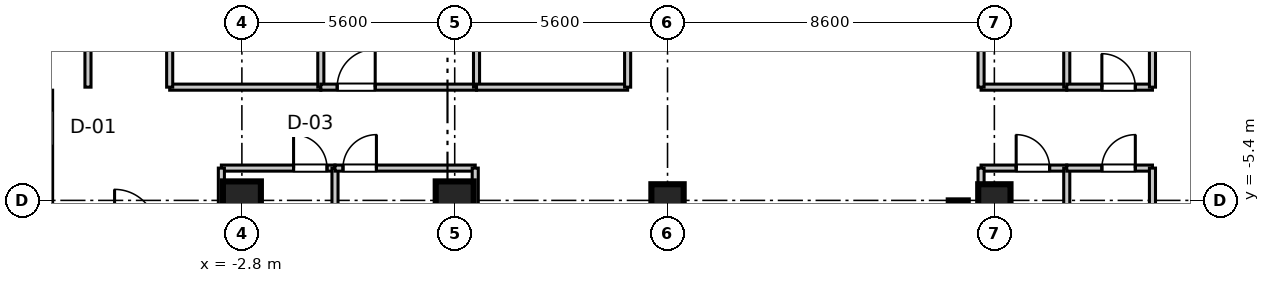
"""IFC4 building model, lengths in metres.
Left out: names, types, materials, properties, quantities, classifications, styles, units other than length and angle.
Written with IfcOpenShell. Run it as: python <this file> out.ifc"""

import sys

from ifc_helpers import new_model, si_unit, direction, frame, frame_2d, origin, origin_2d, place, context, subcontext, project, spatial, rectangle, extrude, source, transform, mapped, element, fill, save


model = new_model("IFC4")
c1 = context("Model", 3, precision=1e-05, world=origin(), true_north=direction((0.0, 1.0)))
c2 = subcontext(c1, "Body", "Model", "MODEL_VIEW")
j1 = project(units=[si_unit("LENGTHUNIT", "METRE"), si_unit("PLANEANGLEUNIT", "RADIAN")], contexts=[c1])
p1 = place(None, origin())
s1 = spatial("IfcSite", under=j1, at=p1, CompositionType="ELEMENT")
p2 = place(p1, origin())
s2 = spatial("IfcBuilding", under=s1, at=p2, CompositionType="ELEMENT")
p3 = place(p2, frame((0.0, 0.0, 219.7)))
s3 = spatial("IfcBuildingStorey", under=s2, at=p3, CompositionType="ELEMENT", Elevation=219.7)
m1 = source(origin(), c2, "Body", "SweptSolid", [
    extrude(rectangle(XDim=1.0, YDim=1.0, at=origin_2d()), origin(), (0.0, 0.0, 1.0), 3.655),
])
for number, where, z_axis, x_axis in (
    (1, (-2.8, -5.4, 0.0), (0.0, 0.0, 1.0), (1.0, 0.0, 0.0)),
    (2, (2.8, -5.4, 0.0), (0.0, 0.0, 1.0), (1.0, 0.0, 0.0)),
):
    element("IfcColumn", number, at=place(p3, frame(where, z_axis=z_axis, x_axis=x_axis)), inside=s3, PredefinedType="COLUMN", context=c2, shape_type="MappedRepresentation", body=[
        mapped(m1, transform((0.0, 0.0, 0.0), scale=1.0)),
    ])
m2 = source(origin(), c2, "Body", "SweptSolid", [
    extrude(rectangle(XDim=0.85, YDim=0.85, at=origin_2d()), origin(), (0.0, 0.0, 1.0), 3.655),
])
for number, where, z_axis, x_axis in (
    (3, (8.4, -5.4, 0.0), (0.0, 0.0, 1.0), (1.0, 0.0, 0.0)),
    (4, (17.0, -5.4, 0.0), (0.0, 0.0, 1.0), (1.0, 0.0, 0.0)),
):
    element("IfcColumn", number, at=place(p3, frame(where, z_axis=z_axis, x_axis=x_axis)), inside=s3, PredefinedType="PILASTER", context=c2, shape_type="MappedRepresentation", body=[
        mapped(m2, transform((0.0, 0.0, 0.0), scale=1.0)),
    ])
m3 = source(origin(), c2, "Body", "SweptSolid", [
    extrude(rectangle(XDim=11.6, YDim=0.5, at=frame_2d((5.8, 0.0))), origin(), (0.0, 0.0, 1.0), 3.41),
])
p4 = place(p3, frame((16.05, -17.0, 0.0), z_axis=(0.0, 0.0, 1.0), x_axis=(0.0, 1.0, 0.0)))
e5 = element("IfcWall", 5, at=p4, inside=s3, PredefinedType="SHEAR", context=c2, shape_type="MappedRepresentation", body=[
    mapped(m3, transform((0.0, 0.0, 0.0), scale=1.0)),
])
m4 = source(origin(), c2, "Body", "SweptSolid", [
    extrude(rectangle(XDim=2.255, YDim=0.16, at=frame_2d((1.127, 0.0))), origin(), (0.0, 0.0, 1.0), 2.75),
])
p5 = place(p3, frame((16.65, -4.55, 0.0), z_axis=(0.0, 0.0, 1.0), x_axis=(1.0, 0.0, 0.0)))
e6 = element("IfcWall", 6, at=p5, inside=s3, PredefinedType="PARTITIONING", context=c2, shape_type="MappedRepresentation", body=[
    mapped(m4, transform((0.0, 0.0, 0.0), scale=1.0)),
])
p6 = place(p5, frame((0.924, 0.0, 0.0)))
e7 = element("IfcOpeningElement", 7, at=p6, cuts=e6, PredefinedType="OPENING", context=c2, shape_type="SweptSolid", body=[
    extrude(rectangle(XDim=0.88, YDim=2.1, at=frame_2d((0.44, 1.05))), frame((0.0, 0.09, 0.0), z_axis=(0.0, -1.0, 0.0), x_axis=(1.0, 0.0, 0.0)), (0.0, 0.0, 1.0), 0.18),
])
m5 = source(origin(), c2, "Body", "SweptSolid", [
    extrude(rectangle(XDim=19.35, YDim=0.16, at=frame_2d((9.675, 0.0))), origin(), (0.0, 0.0, 1.0), 2.75),
])
for number, where, z_axis, x_axis in (
    (8, (16.65, -23.9, 0.0), (0.0, 0.0, 1.0), (0.0, 1.0, 0.0)),
    (9, (18.905, -23.9, 0.0), (0.0, 0.0, 1.0), (0.0, 1.0, 0.0)),
):
    element("IfcWall", number, at=place(p3, frame(where, z_axis=z_axis, x_axis=x_axis)), inside=s3, PredefinedType="PARTITIONING", context=c2, shape_type="MappedRepresentation", body=[
        mapped(m5, transform((0.0, 0.0, 0.0), scale=1.0)),
    ])
m6 = source(origin(), c2, "Body", "SweptSolid", [
    extrude(rectangle(XDim=2.255, YDim=0.16, at=frame_2d((1.127, 0.0))), origin(), (0.0, 0.0, 1.0), 2.75),
])
p7 = place(p3, frame((18.905, -4.55, 0.0), z_axis=(0.0, 0.0, 1.0), x_axis=(1.0, 0.0, 0.0)))
e10 = element("IfcWall", 10, at=p7, inside=s3, PredefinedType="PARTITIONING", context=c2, shape_type="MappedRepresentation", body=[
    mapped(m6, transform((0.0, 0.0, 0.0), scale=1.0)),
])
p8 = place(p7, frame((0.924, 0.0, 0.0)))
e11 = element("IfcOpeningElement", 11, at=p8, cuts=e10, PredefinedType="OPENING", context=c2, shape_type="SweptSolid", body=[
    extrude(rectangle(XDim=0.88, YDim=2.1, at=frame_2d((0.44, 1.05))), frame((0.0, 0.09, 0.0), z_axis=(0.0, -1.0, 0.0), x_axis=(1.0, 0.0, 0.0)), (0.0, 0.0, 1.0), 0.18),
])
m7 = source(origin(), c2, "Body", "SweptSolid", [
    extrude(rectangle(XDim=17.93, YDim=0.16, at=frame_2d((8.965, 0.0))), origin(), (0.0, 0.0, 1.0), 2.75),
])
p9 = place(p3, frame((21.16, -22.48, 0.0), z_axis=(0.0, 0.0, 1.0), x_axis=(0.0, 1.0, 0.0)))
e12 = element("IfcWall", 12, at=p9, inside=s3, PredefinedType="PARTITIONING", context=c2, shape_type="MappedRepresentation", body=[
    mapped(m7, transform((0.0, 0.0, 0.0), scale=1.0)),
])
m8 = source(origin(), c2, "Body", "SweptSolid", [
    extrude(rectangle(XDim=21.4, YDim=0.16, at=frame_2d((10.7, 0.0))), origin(), (0.0, 0.0, 1.0), 2.75),
])
p10 = place(p3, frame((-7.86, -23.9, 0.0), z_axis=(0.0, 0.0, 1.0), x_axis=(0.0, 1.0, 0.0)))
e13 = element("IfcWall", 13, at=p10, inside=s3, PredefinedType="PARTITIONING", context=c2, shape_type="MappedRepresentation", body=[
    mapped(m8, transform((0.0, 0.0, 0.0), scale=1.0)),
])
p11 = place(p10, frame((19.925, 0.0, 0.0)))
e14 = element("IfcOpeningElement", 14, at=p11, cuts=e13, PredefinedType="OPENING", context=c2, shape_type="SweptSolid", body=[
    extrude(rectangle(XDim=0.95, YDim=2.1, at=frame_2d((0.475, 1.05))), frame((0.0, 0.09, 0.0), z_axis=(0.0, -1.0, 0.0), x_axis=(1.0, 0.0, 0.0)), (0.0, 0.0, 1.0), 0.18),
])
m9 = source(origin(), c2, "Body", "SweptSolid", [
    extrude(rectangle(XDim=2.99, YDim=0.16, at=frame_2d((1.495, 0.0))), origin(), (0.0, 0.0, 1.0), 2.75),
])
p12 = place(p3, frame((-3.34, -4.55, 0.0), z_axis=(0.0, 0.0, 1.0), x_axis=(1.0, 0.0, 0.0)))
e15 = element("IfcWall", 15, at=p12, inside=s3, PredefinedType="PARTITIONING", context=c2, shape_type="MappedRepresentation", body=[
    mapped(m9, transform((0.0, 0.0, 0.0), scale=1.0)),
])
p13 = place(p12, frame((1.9, 0.0, 0.0)))
e16 = element("IfcOpeningElement", 16, at=p13, cuts=e15, PredefinedType="OPENING", context=c2, shape_type="SweptSolid", body=[
    extrude(rectangle(XDim=0.88, YDim=2.1, at=frame_2d((0.44, 1.05))), frame((0.0, 0.09, 0.0), z_axis=(0.0, -1.0, 0.0), x_axis=(1.0, 0.0, 0.0)), (0.0, 0.0, 1.0), 0.18),
])
for number, where, z_axis, x_axis in (
    (17, (-3.34, -23.9, 0.0), (0.0, 0.0, 1.0), (0.0, 1.0, 0.0)),
    (18, (-0.35, -23.9, 0.0), (0.0, 0.0, 1.0), (0.0, 1.0, 0.0)),
):
    element("IfcWall", number, at=place(p3, frame(where, z_axis=z_axis, x_axis=x_axis)), inside=s3, PredefinedType="PARTITIONING", context=c2, shape_type="MappedRepresentation", body=[
        mapped(m5, transform((0.0, 0.0, 0.0), scale=1.0)),
    ])
m10 = source(origin(), c2, "Body", "SweptSolid", [
    extrude(rectangle(XDim=3.69, YDim=0.16, at=frame_2d((1.845, 0.0))), origin(), (0.0, 0.0, 1.0), 2.75),
])
p14 = place(p3, frame((-0.35, -4.55, 0.0), z_axis=(0.0, 0.0, 1.0), x_axis=(1.0, 0.0, 0.0)))
e19 = element("IfcWall", 19, at=p14, inside=s3, PredefinedType="PARTITIONING", context=c2, shape_type="MappedRepresentation", body=[
    mapped(m10, transform((0.0, 0.0, 0.0), scale=1.0)),
])
p15 = place(p14, frame((0.21, 0.0, 0.0)))
e20 = element("IfcOpeningElement", 20, at=p15, cuts=e19, PredefinedType="OPENING", context=c2, shape_type="SweptSolid", body=[
    extrude(rectangle(XDim=0.88, YDim=2.1, at=frame_2d((0.44, 1.05))), frame((0.0, 0.09, 0.0), z_axis=(0.0, -1.0, 0.0), x_axis=(1.0, 0.0, 0.0)), (0.0, 0.0, 1.0), 0.18),
])
p16 = place(p3, frame((3.34, -23.9, 0.0), z_axis=(0.0, 0.0, 1.0), x_axis=(0.0, 1.0, 0.0)))
e21 = element("IfcWall", 21, at=p16, inside=s3, PredefinedType="PARTITIONING", context=c2, shape_type="MappedRepresentation", body=[
    mapped(m5, transform((0.0, 0.0, 0.0), scale=1.0)),
])
m11 = source(origin(), c2, "Body", "SweptSolid", [
    extrude(rectangle(XDim=4.84, YDim=0.16, at=frame_2d((2.42, 0.0))), origin(), (0.0, 0.0, 1.0), 2.75),
])
p17 = place(p3, frame((-6.85, -2.42, 0.0), z_axis=(0.0, 0.0, 1.0), x_axis=(0.0, 1.0, 0.0)))
e22 = element("IfcWall", 22, at=p17, inside=s3, PredefinedType="PARTITIONING", context=c2, shape_type="MappedRepresentation", body=[
    mapped(m11, transform((0.0, 0.0, 0.0), scale=1.0)),
])
p18 = place(p17, frame((1.945, 0.0, 0.0)))
e23 = element("IfcOpeningElement", 23, at=p18, cuts=e22, PredefinedType="OPENING", context=c2, shape_type="SweptSolid", body=[
    extrude(rectangle(XDim=0.95, YDim=2.1, at=frame_2d((0.475, 1.05))), frame((0.0, 0.09, 0.0), z_axis=(0.0, -1.0, 0.0), x_axis=(1.0, 0.0, 0.0)), (0.0, 0.0, 1.0), 0.18),
])
m12 = source(origin(), c2, "Body", "SweptSolid", [
    extrude(rectangle(XDim=3.977, YDim=0.16, at=frame_2d((1.989, 0.0))), origin(), (0.0, 0.0, 1.0), 2.75),
])
p19 = place(p3, frame((-4.7, -2.42, 0.0), z_axis=(0.0, 0.0, 1.0), x_axis=(1.0, 0.0, 0.0)))
e24 = element("IfcWall", 24, at=p19, inside=s3, PredefinedType="PARTITIONING", context=c2, shape_type="MappedRepresentation", body=[
    mapped(m12, transform((0.0, 0.0, 0.0), scale=1.0)),
])
for number, where, z_axis, x_axis in (
    (25, (-4.7, -2.42, 0.0), (0.0, 0.0, 1.0), (0.0, 1.0, 0.0)),
    (26, (-0.723, -2.42, 0.0), (0.0, 0.0, 1.0), (0.0, 1.0, 0.0)),
):
    element("IfcWall", number, at=place(p3, frame(where, z_axis=z_axis, x_axis=x_axis)), inside=s3, PredefinedType="PARTITIONING", context=c2, shape_type="MappedRepresentation", body=[
        mapped(m11, transform((0.0, 0.0, 0.0), scale=1.0)),
    ])
m13 = source(origin(), c2, "Body", "SweptSolid", [
    extrude(rectangle(XDim=4.097, YDim=0.16, at=frame_2d((2.048, 0.0))), origin(), (0.0, 0.0, 1.0), 2.75),
])
p20 = place(p3, frame((-0.723, -2.42, 0.0), z_axis=(0.0, 0.0, 1.0), x_axis=(1.0, 0.0, 0.0)))
e27 = element("IfcWall", 27, at=p20, inside=s3, PredefinedType="PARTITIONING", context=c2, shape_type="MappedRepresentation", body=[
    mapped(m13, transform((0.0, 0.0, 0.0), scale=1.0)),
])
p21 = place(p20, frame((0.431, 0.0, 0.0)))
e28 = element("IfcOpeningElement", 28, at=p21, cuts=e27, PredefinedType="OPENING", context=c2, shape_type="SweptSolid", body=[
    extrude(rectangle(XDim=1.0, YDim=2.1, at=frame_2d((0.5, 1.05))), frame((0.0, 0.09, 0.0), z_axis=(0.0, -1.0, 0.0), x_axis=(1.0, 0.0, 0.0)), (0.0, 0.0, 1.0), 0.18),
])
p22 = place(p3, frame((3.374, -2.42, 0.0), z_axis=(0.0, 0.0, 1.0), x_axis=(0.0, 1.0, 0.0)))
e29 = element("IfcWall", 29, at=p22, inside=s3, PredefinedType="PARTITIONING", context=c2, shape_type="MappedRepresentation", body=[
    mapped(m11, transform((0.0, 0.0, 0.0), scale=1.0)),
])
m14 = source(origin(), c2, "Body", "SweptSolid", [
    extrude(rectangle(XDim=3.976, YDim=0.16, at=frame_2d((1.988, 0.0))), origin(), (0.0, 0.0, 1.0), 2.75),
])
p23 = place(p3, frame((3.374, -2.42, 0.0), z_axis=(0.0, 0.0, 1.0), x_axis=(1.0, 0.0, 0.0)))
e30 = element("IfcWall", 30, at=p23, inside=s3, PredefinedType="PARTITIONING", context=c2, shape_type="MappedRepresentation", body=[
    mapped(m14, transform((0.0, 0.0, 0.0), scale=1.0)),
])
p24 = place(p3, frame((7.35, -2.42, 0.0), z_axis=(0.0, 0.0, 1.0), x_axis=(0.0, 1.0, 0.0)))
e31 = element("IfcWall", 31, at=p24, inside=s3, PredefinedType="PARTITIONING", context=c2, shape_type="MappedRepresentation", body=[
    mapped(m11, transform((0.0, 0.0, 0.0), scale=1.0)),
])
p25 = place(p3, frame((16.65, -2.42, 0.0), z_axis=(0.0, 0.0, 1.0), x_axis=(1.0, 0.0, 0.0)))
e32 = element("IfcWall", 32, at=p25, inside=s3, PredefinedType="PARTITIONING", context=c2, shape_type="MappedRepresentation", body=[
    mapped(m4, transform((0.0, 0.0, 0.0), scale=1.0)),
])
for number, where, z_axis, x_axis in (
    (33, (16.65, -2.42, 0.0), (0.0, 0.0, 1.0), (0.0, 1.0, 0.0)),
    (34, (18.905, -2.42, 0.0), (0.0, 0.0, 1.0), (0.0, 1.0, 0.0)),
):
    element("IfcWall", number, at=place(p3, frame(where, z_axis=z_axis, x_axis=x_axis)), inside=s3, PredefinedType="PARTITIONING", context=c2, shape_type="MappedRepresentation", body=[
        mapped(m11, transform((0.0, 0.0, 0.0), scale=1.0)),
    ])
p26 = place(p3, frame((18.905, -2.42, 0.0), z_axis=(0.0, 0.0, 1.0), x_axis=(1.0, 0.0, 0.0)))
e35 = element("IfcWall", 35, at=p26, inside=s3, PredefinedType="PARTITIONING", context=c2, shape_type="MappedRepresentation", body=[
    mapped(m6, transform((0.0, 0.0, 0.0), scale=1.0)),
])
p27 = place(p26, frame((0.924, 0.0, 0.0)))
e36 = element("IfcOpeningElement", 36, at=p27, cuts=e35, PredefinedType="OPENING", context=c2, shape_type="SweptSolid", body=[
    extrude(rectangle(XDim=0.88, YDim=2.1, at=frame_2d((0.44, 1.05))), frame((0.0, 0.09, 0.0), z_axis=(0.0, -1.0, 0.0), x_axis=(1.0, 0.0, 0.0)), (0.0, 0.0, 1.0), 0.18),
])
p28 = place(p3, frame((21.16, -2.42, 0.0), z_axis=(0.0, 0.0, 1.0), x_axis=(0.0, 1.0, 0.0)))
e37 = element("IfcWall", 37, at=p28, inside=s3, PredefinedType="PARTITIONING", context=c2, shape_type="MappedRepresentation", body=[
    mapped(m11, transform((0.0, 0.0, 0.0), scale=1.0)),
])
m15 = source(origin(), c2, "Body", "SweptSolid", [
    extrude(rectangle(XDim=0.88, YDim=2.1, at=frame_2d((0.44, 1.05))), frame((0.0, 0.025, 0.0), z_axis=(0.0, -1.0, 0.0), x_axis=(1.0, 0.0, 0.0)), (0.0, 0.0, 1.0), 0.05),
])
p29 = place(p6, frame((0.88, 0.0, 0.0), z_axis=(0.0, 0.0, 1.0), x_axis=(-1.0, 0.0, 0.0)))
e38 = element("IfcDoor", 38, at=p29, inside=s3, OperationType="SINGLE_SWING_LEFT", PredefinedType="DOOR", context=c2, shape_type="MappedRepresentation", body=[
    mapped(m15, transform((0.0, 0.0, 0.0), scale=1.0)),
])
fill(e7, e38)
p30 = place(p8, frame((0.88, 0.0, 0.0), z_axis=(0.0, 0.0, 1.0), x_axis=(-1.0, 0.0, 0.0)))
e39 = element("IfcDoor", 39, at=p30, inside=s3, OperationType="SINGLE_SWING_RIGHT", PredefinedType="DOOR", context=c2, shape_type="MappedRepresentation", body=[
    mapped(m15, transform((0.0, 0.0, 0.0), scale=1.0)),
])
fill(e11, e39)
p31 = place(p13, frame((0.88, 0.0, 0.0), z_axis=(0.0, 0.0, 1.0), x_axis=(-1.0, 0.0, 0.0)))
e40 = element("IfcDoor", 40, at=p31, inside=s3, OperationType="SINGLE_SWING_LEFT", PredefinedType="DOOR", context=c2, shape_type="MappedRepresentation", body=[
    mapped(m15, transform((0.0, 0.0, 0.0), scale=1.0)),
])
fill(e16, e40)
p32 = place(p15, frame((0.88, 0.0, 0.0), z_axis=(0.0, 0.0, 1.0), x_axis=(-1.0, 0.0, 0.0)))
e41 = element("IfcDoor", 41, at=p32, inside=s3, OperationType="SINGLE_SWING_RIGHT", PredefinedType="DOOR", context=c2, shape_type="MappedRepresentation", body=[
    mapped(m15, transform((0.0, 0.0, 0.0), scale=1.0)),
])
fill(e20, e41)
m16 = source(origin(), c2, "Body", "SweptSolid", [
    extrude(rectangle(XDim=1.0, YDim=2.1, at=frame_2d((0.5, 1.05))), frame((0.0, 0.025, 0.0), z_axis=(0.0, -1.0, 0.0), x_axis=(1.0, 0.0, 0.0)), (0.0, 0.0, 1.0), 0.05),
])
p33 = place(p21, origin())
e42 = element("IfcDoor", 42, at=p33, inside=s3, OperationType="SINGLE_SWING_RIGHT", PredefinedType="DOOR", context=c2, shape_type="MappedRepresentation", body=[
    mapped(m16, transform((0.0, 0.0, 0.0), scale=1.0)),
])
fill(e28, e42)
p34 = place(p27, origin())
e43 = element("IfcDoor", 43, at=p34, inside=s3, OperationType="SINGLE_SWING_LEFT", PredefinedType="DOOR", context=c2, shape_type="MappedRepresentation", body=[
    mapped(m15, transform((0.0, 0.0, 0.0), scale=1.0)),
])
fill(e36, e43)
save(model, sys.argv[1])
